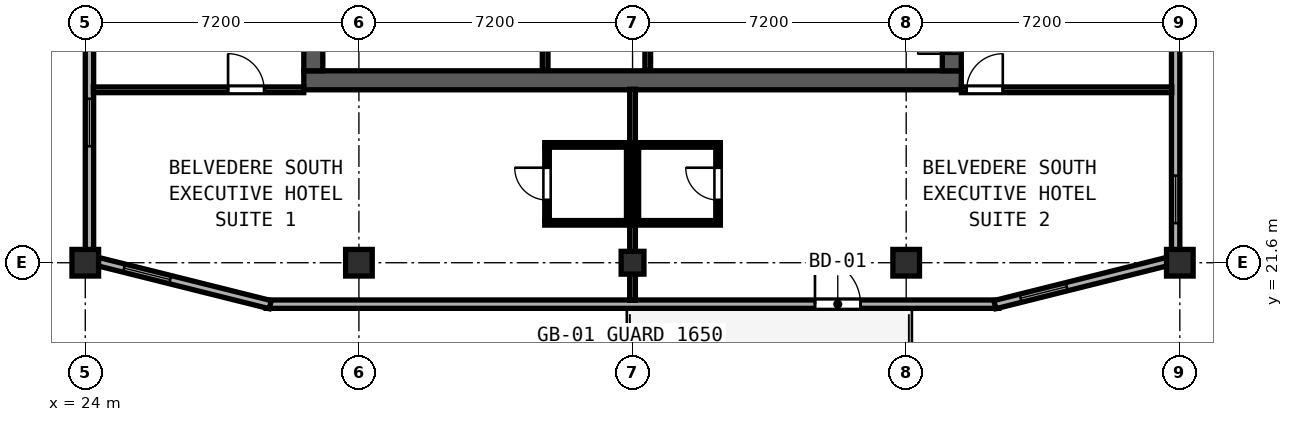
"""IFC4 building model, lengths in metres.
Left out: names, types, materials, properties, quantities, classifications, styles, units other than length and angle.
Written with IfcOpenShell. Run it as: python <this file> out.ifc"""

import sys

from ifc_helpers import new_model, si_unit, direction, frame, frame_2d, origin, origin_2d, place, context, subcontext, project, spatial, rectangle, hollow_rectangle, extrude, element, fill, save


model = new_model("IFC4")
c1 = context("Model", 3, precision=1e-05, world=origin(), true_north=direction((0.0, 1.0)))
c2 = subcontext(c1, "Body", "Model", "MODEL_VIEW")
j1 = project(units=[si_unit("LENGTHUNIT", "METRE"), si_unit("PLANEANGLEUNIT", "RADIAN")], contexts=[c1])
p1 = place(None, origin())
s1 = spatial("IfcSite", under=j1, at=p1, CompositionType="ELEMENT")
p2 = place(p1, origin())
s2 = spatial("IfcBuilding", under=s1, at=p2, CompositionType="ELEMENT")
p3 = place(p2, frame((0.0, 0.0, 293.9)))
s3 = spatial("IfcBuildingStorey", under=s2, at=p3, CompositionType="ELEMENT", Elevation=293.9)
p4 = place(p3, frame((29.75, 26.4, 0.0), z_axis=(0.0, 0.0, 1.0), x_axis=(1.0, 0.0, 0.0)))
e1 = element("IfcWall", 1, at=p4, inside=s3, PredefinedType="SHEAR", context=c2, shape_type="SweptSolid", body=[
    extrude(rectangle(XDim=17.3, YDim=0.5, at=frame_2d((8.65, 0.0))), origin(), (0.0, 0.0, 1.0), 3.72),
])
p5 = place(p3, frame((30.0, 26.65, 0.0), z_axis=(0.0, 0.0, 1.0), x_axis=(0.0, 1.0, 0.0)))
e2 = element("IfcWall", 2, at=p5, inside=s3, PredefinedType="SHEAR", context=c2, shape_type="SweptSolid", body=[
    extrude(rectangle(XDim=4.2, YDim=0.5, at=frame_2d((2.1, 0.0))), origin(), (0.0, 0.0, 1.0), 3.72),
])
p6 = place(p3, frame((46.8, 26.65, 0.0), z_axis=(0.0, 0.0, 1.0), x_axis=(0.0, 1.0, 0.0)))
e3 = element("IfcWall", 3, at=p6, inside=s3, PredefinedType="SHEAR", context=c2, shape_type="SweptSolid", body=[
    extrude(rectangle(XDim=4.2, YDim=0.5, at=frame_2d((2.1, 0.0))), origin(), (0.0, 0.0, 1.0), 3.72),
])
p7 = place(p6, frame((1.35, 0.0, 0.0), z_axis=(0.0, 0.0, 1.0), x_axis=(-1.0, 0.0, 0.0)))
e4 = element("IfcOpeningElement", 4, at=p7, cuts=e3, PredefinedType="OPENING", context=c2, shape_type="SweptSolid", body=[
    extrude(rectangle(XDim=0.9, YDim=2.1, at=frame_2d((0.45, 1.05))), frame((0.0, 0.26, 0.0), z_axis=(0.0, -1.0, 0.0), x_axis=(1.0, 0.0, 0.0)), (0.0, 0.0, 1.0), 0.52),
])
for number, where, z_axis, x_axis in (
    (5, (24.0, 21.6, 0.0), (0.0, 0.0, 1.0), (1.0, 0.0, 0.0)),
    (6, (52.8, 21.6, 0.0), (0.0, 0.0, 1.0), (1.0, 0.0, 0.0)),
    (7, (31.2, 21.6, 0.0), (0.0, 0.0, 1.0), (1.0, 0.0, 0.0)),
    (8, (45.6, 21.6, 0.0), (0.0, 0.0, 1.0), (1.0, 0.0, 0.0)),
):
    element("IfcColumn", number, at=place(p3, frame(where, z_axis=z_axis, x_axis=x_axis)), inside=s3, PredefinedType="COLUMN", context=c2, shape_type="SweptSolid", body=[
        extrude(hollow_rectangle(XDim=0.7, YDim=0.7, WallThickness=0.026, at=origin_2d()), origin(), (0.0, 0.0, 1.0), 3.9),
    ])
p8 = place(p3, frame((38.4, 21.6, 0.0), z_axis=(0.0, 0.0, 1.0), x_axis=(1.0, 0.0, 0.0)))
e9 = element("IfcColumn", 9, at=p8, inside=s3, PredefinedType="COLUMN", context=c2, shape_type="SweptSolid", body=[
    extrude(hollow_rectangle(XDim=0.6, YDim=0.6, WallThickness=0.024, at=origin_2d()), origin(), (0.0, 0.0, 1.0), 3.9),
])
p9 = place(p3, frame((28.759, 20.51, 0.0), z_axis=(0.0, 0.0, 1.0), x_axis=(1.0, 0.0, 0.0)))
e10 = element("IfcWall", 10, at=p9, inside=s3, PredefinedType="SOLIDWALL", context=c2, shape_type="SweptSolid", body=[
    extrude(rectangle(XDim=19.283, YDim=0.22, at=frame_2d((9.642, 0.0))), origin(), (0.0, 0.0, 1.0), 3.72),
])
p10 = place(p9, frame((15.641, 0.0, 0.0), z_axis=(0.0, 0.0, 1.0), x_axis=(-1.0, 0.0, 0.0)))
e11 = element("IfcOpeningElement", 11, at=p10, cuts=e10, PredefinedType="OPENING", context=c2, shape_type="SweptSolid", body=[
    extrude(rectangle(XDim=1.2, YDim=2.15, at=frame_2d((0.6, 1.075))), frame((0.0, 0.12, 0.0), z_axis=(0.0, -1.0, 0.0), x_axis=(1.0, 0.0, 0.0)), (0.0, 0.0, 1.0), 0.24),
])
p11 = place(p3, frame((47.933, 20.497, 0.0), z_axis=(0.0, 0.0, 1.0), x_axis=(0.970136341762, 0.242560257242, 0.0)))
e12 = element("IfcWall", 12, at=p11, inside=s3, PredefinedType="SOLIDWALL", context=c2, shape_type="SweptSolid", body=[
    extrude(rectangle(XDim=4.664, YDim=0.22, at=frame_2d((2.332, 0.0))), origin(), (0.0, 0.0, 1.0), 3.365),
])
p12 = place(p11, frame((0.7, 0.0, 0.85)))
e13 = element("IfcOpeningElement", 13, at=p12, cuts=e12, PredefinedType="OPENING", context=c2, shape_type="SweptSolid", body=[
    extrude(rectangle(XDim=1.25, YDim=1.95, at=frame_2d((0.625, 0.975))), frame((0.0, 0.12, 0.0), z_axis=(0.0, -1.0, 0.0), x_axis=(1.0, 0.0, 0.0)), (0.0, 0.0, 1.0), 0.24),
])
p13 = place(p3, frame((52.69, 21.942, 0.0), z_axis=(0.0, 0.0, 1.0), x_axis=(0.0, 1.0, 0.0)))
e14 = element("IfcWall", 14, at=p13, inside=s3, PredefinedType="SOLIDWALL", context=c2, shape_type="SweptSolid", body=[
    extrude(rectangle(XDim=5.366, YDim=0.22, at=frame_2d((2.683, 0.0))), origin(), (0.0, 0.0, 1.0), 3.365),
])
p14 = place(p13, frame((0.7, 0.0, 0.85)))
e15 = element("IfcOpeningElement", 15, at=p14, cuts=e14, PredefinedType="OPENING", context=c2, shape_type="SweptSolid", body=[
    extrude(rectangle(XDim=1.25, YDim=1.95, at=frame_2d((0.625, 0.975))), frame((0.0, 0.12, 0.0), z_axis=(0.0, -1.0, 0.0), x_axis=(1.0, 0.0, 0.0)), (0.0, 0.0, 1.0), 0.24),
])
p15 = place(p3, frame((24.11, 27.308, 0.0), z_axis=(0.0, 0.0, 1.0), x_axis=(0.0, -1.0, 0.0)))
e16 = element("IfcWall", 16, at=p15, inside=s3, PredefinedType="SOLIDWALL", context=c2, shape_type="SweptSolid", body=[
    extrude(rectangle(XDim=5.366, YDim=0.22, at=frame_2d((2.683, 0.0))), origin(), (0.0, 0.0, 1.0), 3.365),
])
p16 = place(p15, frame((1.393, 0.0, 0.85)))
e17 = element("IfcOpeningElement", 17, at=p16, cuts=e16, PredefinedType="OPENING", context=c2, shape_type="SweptSolid", body=[
    extrude(rectangle(XDim=1.25, YDim=1.95, at=frame_2d((0.625, 0.975))), frame((0.0, 0.12, 0.0), z_axis=(0.0, -1.0, 0.0), x_axis=(1.0, 0.0, 0.0)), (0.0, 0.0, 1.0), 0.24),
])
p17 = place(p3, frame((24.342, 21.628, 0.0), z_axis=(0.0, 0.0, 1.0), x_axis=(0.970136341762, -0.242560257242, 0.0)))
e18 = element("IfcWall", 18, at=p17, inside=s3, PredefinedType="SOLIDWALL", context=c2, shape_type="SweptSolid", body=[
    extrude(rectangle(XDim=4.664, YDim=0.22, at=frame_2d((2.332, 0.0))), origin(), (0.0, 0.0, 1.0), 3.365),
])
p18 = place(p17, frame((0.7, 0.0, 0.85)))
e19 = element("IfcOpeningElement", 19, at=p18, cuts=e18, PredefinedType="OPENING", context=c2, shape_type="SweptSolid", body=[
    extrude(rectangle(XDim=1.25, YDim=1.95, at=frame_2d((0.625, 0.975))), frame((0.0, 0.12, 0.0), z_axis=(0.0, -1.0, 0.0), x_axis=(1.0, 0.0, 0.0)), (0.0, 0.0, 1.0), 0.24),
])
p19 = place(p3, frame((38.8, 26.66, 0.0), z_axis=(0.0, 0.0, 1.0), x_axis=(0.0, 1.0, 0.0)))
e20 = element("IfcWall", 20, at=p19, inside=s3, PredefinedType="SOLIDWALL", context=c2, shape_type="SweptSolid", body=[
    extrude(rectangle(XDim=4.075, YDim=0.15, at=frame_2d((2.038, 0.0))), origin(), (0.0, 0.0, 1.0), 3.72),
])
p20 = place(p3, frame((36.1, 26.66, 0.0), z_axis=(0.0, 0.0, 1.0), x_axis=(0.0, 1.0, 0.0)))
e21 = element("IfcWall", 21, at=p20, inside=s3, PredefinedType="PARTITIONING", context=c2, shape_type="SweptSolid", body=[
    extrude(rectangle(XDim=4.075, YDim=0.15, at=frame_2d((2.038, 0.0))), origin(), (0.0, 0.0, 1.0), 3.72),
])
p21 = place(p3, frame((24.212, 26.15, 0.0), z_axis=(0.0, 0.0, 1.0), x_axis=(1.0, 0.0, 0.0)))
e22 = element("IfcWall", 22, at=p21, inside=s3, PredefinedType="PARTITIONING", context=c2, shape_type="SweptSolid", body=[
    extrude(rectangle(XDim=5.536, YDim=0.15, at=frame_2d((2.768, 0.0))), origin(), (0.0, 0.0, 1.0), 3.72),
])
p22 = place(p21, frame((4.495, 0.0, 0.0), z_axis=(0.0, 0.0, 1.0), x_axis=(-1.0, 0.0, 0.0)))
e23 = element("IfcOpeningElement", 23, at=p22, cuts=e22, PredefinedType="OPENING", context=c2, shape_type="SweptSolid", body=[
    extrude(rectangle(XDim=0.95, YDim=2.18, at=frame_2d((0.475, 1.09))), frame((0.0, 0.085, 0.0), z_axis=(0.0, -1.0, 0.0), x_axis=(1.0, 0.0, 0.0)), (0.0, 0.0, 1.0), 0.17),
])
p23 = place(p3, frame((38.4, 20.612, 0.0), z_axis=(0.0, 0.0, 1.0), x_axis=(0.0, 1.0, 0.0)))
e24 = element("IfcWall", 24, at=p23, inside=s3, PredefinedType="PARTITIONING", context=c2, shape_type="SweptSolid", body=[
    extrude(rectangle(XDim=5.553, YDim=0.15, at=frame_2d((2.776, 0.0))), origin(), (0.0, 0.0, 1.0), 3.205),
])
for number, where, z_axis, x_axis in (
    (25, (36.09, 24.7, 0.0), (0.0, 0.0, 1.0), (1.0, 0.0, 0.0)),
    (26, (36.09, 22.65, 0.0), (0.0, 0.0, 1.0), (1.0, 0.0, 0.0)),
):
    element("IfcWall", number, at=place(p3, frame(where, z_axis=z_axis, x_axis=x_axis)), inside=s3, PredefinedType="PARTITIONING", context=c2, shape_type="SweptSolid", body=[
        extrude(rectangle(XDim=2.25, YDim=0.12, at=frame_2d((1.125, 0.0))), origin(), (0.0, 0.0, 1.0), 3.72),
    ])
p24 = place(p3, frame((36.15, 22.695, 0.0), z_axis=(0.0, 0.0, 1.0), x_axis=(0.0, 1.0, 0.0)))
e27 = element("IfcWall", 27, at=p24, inside=s3, PredefinedType="PARTITIONING", context=c2, shape_type="SweptSolid", body=[
    extrude(rectangle(XDim=1.96, YDim=0.12, at=frame_2d((0.98, 0.0))), origin(), (0.0, 0.0, 1.0), 3.72),
])
p25 = place(p24, frame((1.405, 0.0, 0.0), z_axis=(0.0, 0.0, 1.0), x_axis=(-1.0, 0.0, 0.0)))
e28 = element("IfcOpeningElement", 28, at=p25, cuts=e27, PredefinedType="OPENING", context=c2, shape_type="SweptSolid", body=[
    extrude(rectangle(XDim=0.85, YDim=2.1, at=frame_2d((0.425, 1.05))), frame((0.0, 0.07, 0.0), z_axis=(0.0, -1.0, 0.0), x_axis=(1.0, 0.0, 0.0)), (0.0, 0.0, 1.0), 0.14),
])
p26 = place(p3, frame((38.3, 22.695, 0.0), z_axis=(0.0, 0.0, 1.0), x_axis=(0.0, 1.0, 0.0)))
e29 = element("IfcWall", 29, at=p26, inside=s3, PredefinedType="PARTITIONING", context=c2, shape_type="SweptSolid", body=[
    extrude(rectangle(XDim=1.96, YDim=0.12, at=frame_2d((0.98, 0.0))), origin(), (0.0, 0.0, 1.0), 3.255),
])
p27 = place(p3, frame((47.052, 26.15, 0.0), z_axis=(0.0, 0.0, 1.0), x_axis=(1.0, 0.0, 0.0)))
e30 = element("IfcWall", 30, at=p27, inside=s3, PredefinedType="PARTITIONING", context=c2, shape_type="SweptSolid", body=[
    extrude(rectangle(XDim=5.536, YDim=0.15, at=frame_2d((2.768, 0.0))), origin(), (0.0, 0.0, 1.0), 3.72),
])
p28 = place(p27, frame((1.09, 0.0, 0.0), z_axis=(0.0, 0.0, 1.0), x_axis=(-1.0, 0.0, 0.0)))
e31 = element("IfcOpeningElement", 31, at=p28, cuts=e30, PredefinedType="OPENING", context=c2, shape_type="SweptSolid", body=[
    extrude(rectangle(XDim=0.95, YDim=2.18, at=frame_2d((0.475, 1.09))), frame((0.0, 0.085, 0.0), z_axis=(0.0, -1.0, 0.0), x_axis=(1.0, 0.0, 0.0)), (0.0, 0.0, 1.0), 0.17),
])
for number, where, z_axis, x_axis in (
    (32, (38.46, 24.7, 0.0), (0.0, 0.0, 1.0), (1.0, 0.0, 0.0)),
    (33, (38.46, 22.65, 0.0), (0.0, 0.0, 1.0), (1.0, 0.0, 0.0)),
):
    element("IfcWall", number, at=place(p3, frame(where, z_axis=z_axis, x_axis=x_axis)), inside=s3, PredefinedType="PARTITIONING", context=c2, shape_type="SweptSolid", body=[
        extrude(rectangle(XDim=2.25, YDim=0.12, at=frame_2d((1.125, 0.0))), origin(), (0.0, 0.0, 1.0), 3.72),
    ])
p29 = place(p3, frame((38.5, 22.695, 0.0), z_axis=(0.0, 0.0, 1.0), x_axis=(0.0, 1.0, 0.0)))
e34 = element("IfcWall", 34, at=p29, inside=s3, PredefinedType="PARTITIONING", context=c2, shape_type="SweptSolid", body=[
    extrude(rectangle(XDim=1.96, YDim=0.12, at=frame_2d((0.98, 0.0))), origin(), (0.0, 0.0, 1.0), 3.255),
])
p30 = place(p3, frame((40.65, 22.695, 0.0), z_axis=(0.0, 0.0, 1.0), x_axis=(0.0, 1.0, 0.0)))
e35 = element("IfcWall", 35, at=p30, inside=s3, PredefinedType="PARTITIONING", context=c2, shape_type="SweptSolid", body=[
    extrude(rectangle(XDim=1.96, YDim=0.12, at=frame_2d((0.98, 0.0))), origin(), (0.0, 0.0, 1.0), 3.72),
])
p31 = place(p30, frame((0.555, 0.0, 0.0)))
e36 = element("IfcOpeningElement", 36, at=p31, cuts=e35, PredefinedType="OPENING", context=c2, shape_type="SweptSolid", body=[
    extrude(rectangle(XDim=0.85, YDim=2.1, at=frame_2d((0.425, 1.05))), frame((0.0, 0.07, 0.0), z_axis=(0.0, -1.0, 0.0), x_axis=(1.0, 0.0, 0.0)), (0.0, 0.0, 1.0), 0.14),
])
p32 = place(p12, origin())
e37 = element("IfcWindow", 37, at=p32, inside=s3, PartitioningType="SINGLE_PANEL", PredefinedType="WINDOW", context=c2, shape_type="SweptSolid", body=[
    extrude(rectangle(XDim=1.25, YDim=1.95, at=frame_2d((0.625, 0.975))), frame((0.0, 0.03, 0.0), z_axis=(0.0, -1.0, 0.0), x_axis=(1.0, 0.0, 0.0)), (0.0, 0.0, 1.0), 0.06),
])
fill(e13, e37)
p33 = place(p14, origin())
e38 = element("IfcWindow", 38, at=p33, inside=s3, PartitioningType="SINGLE_PANEL", PredefinedType="WINDOW", context=c2, shape_type="SweptSolid", body=[
    extrude(rectangle(XDim=1.25, YDim=1.95, at=frame_2d((0.625, 0.975))), frame((0.0, 0.03, 0.0), z_axis=(0.0, -1.0, 0.0), x_axis=(1.0, 0.0, 0.0)), (0.0, 0.0, 1.0), 0.06),
])
fill(e15, e38)
p34 = place(p16, origin())
e39 = element("IfcWindow", 39, at=p34, inside=s3, PartitioningType="SINGLE_PANEL", PredefinedType="WINDOW", context=c2, shape_type="SweptSolid", body=[
    extrude(rectangle(XDim=1.25, YDim=1.95, at=frame_2d((0.625, 0.975))), frame((0.0, 0.03, 0.0), z_axis=(0.0, -1.0, 0.0), x_axis=(1.0, 0.0, 0.0)), (0.0, 0.0, 1.0), 0.06),
])
fill(e17, e39)
p35 = place(p18, origin())
e40 = element("IfcWindow", 40, at=p35, inside=s3, PartitioningType="SINGLE_PANEL", PredefinedType="WINDOW", context=c2, shape_type="SweptSolid", body=[
    extrude(rectangle(XDim=1.25, YDim=1.95, at=frame_2d((0.625, 0.975))), frame((0.0, 0.03, 0.0), z_axis=(0.0, -1.0, 0.0), x_axis=(1.0, 0.0, 0.0)), (0.0, 0.0, 1.0), 0.06),
])
fill(e19, e40)
p36 = place(p10, origin())
e41 = element("IfcDoor", 41, at=p36, inside=s3, OperationType="SINGLE_SWING_RIGHT", PredefinedType="DOOR", context=c2, shape_type="SweptSolid", body=[
    extrude(rectangle(XDim=1.2, YDim=2.15, at=frame_2d((0.6, 1.075))), frame((0.0, 0.025, 0.0), z_axis=(0.0, -1.0, 0.0), x_axis=(1.0, 0.0, 0.0)), (0.0, 0.0, 1.0), 0.05),
])
fill(e11, e41)
p37 = place(p7, origin())
e42 = element("IfcDoor", 42, at=p37, inside=s3, OperationType="SINGLE_SWING_RIGHT", PredefinedType="DOOR", context=c2, shape_type="SweptSolid", body=[
    extrude(rectangle(XDim=0.9, YDim=2.1, at=frame_2d((0.45, 1.05))), frame((0.0, -0.135, 0.0), z_axis=(0.0, -1.0, 0.0), x_axis=(1.0, 0.0, 0.0)), (0.0, 0.0, 1.0), 0.05),
])
fill(e4, e42)
p38 = place(p22, origin())
e43 = element("IfcDoor", 43, at=p38, inside=s3, OperationType="SINGLE_SWING_RIGHT", PredefinedType="DOOR", context=c2, shape_type="SweptSolid", body=[
    extrude(rectangle(XDim=0.95, YDim=2.18, at=frame_2d((0.475, 1.09))), frame((0.0, 0.025, 0.0), z_axis=(0.0, -1.0, 0.0), x_axis=(1.0, 0.0, 0.0)), (0.0, 0.0, 1.0), 0.05),
])
fill(e23, e43)
p39 = place(p25, origin())
e44 = element("IfcDoor", 44, at=p39, inside=s3, OperationType="SINGLE_SWING_LEFT", PredefinedType="DOOR", context=c2, shape_type="SweptSolid", body=[
    extrude(rectangle(XDim=0.85, YDim=2.1, at=frame_2d((0.425, 1.05))), frame((0.0, 0.025, 0.0), z_axis=(0.0, -1.0, 0.0), x_axis=(1.0, 0.0, 0.0)), (0.0, 0.0, 1.0), 0.05),
])
fill(e28, e44)
p40 = place(p28, origin())
e45 = element("IfcDoor", 45, at=p40, inside=s3, OperationType="SINGLE_SWING_LEFT", PredefinedType="DOOR", context=c2, shape_type="SweptSolid", body=[
    extrude(rectangle(XDim=0.95, YDim=2.18, at=frame_2d((0.475, 1.09))), frame((0.0, 0.025, 0.0), z_axis=(0.0, -1.0, 0.0), x_axis=(1.0, 0.0, 0.0)), (0.0, 0.0, 1.0), 0.05),
])
fill(e31, e45)
p41 = place(p31, origin())
e46 = element("IfcDoor", 46, at=p41, inside=s3, OperationType="SINGLE_SWING_RIGHT", PredefinedType="DOOR", context=c2, shape_type="SweptSolid", body=[
    extrude(rectangle(XDim=0.85, YDim=2.1, at=frame_2d((0.425, 1.05))), frame((0.0, 0.025, 0.0), z_axis=(0.0, -1.0, 0.0), x_axis=(1.0, 0.0, 0.0)), (0.0, 0.0, 1.0), 0.05),
])
fill(e36, e46)
save(model, sys.argv[1])
